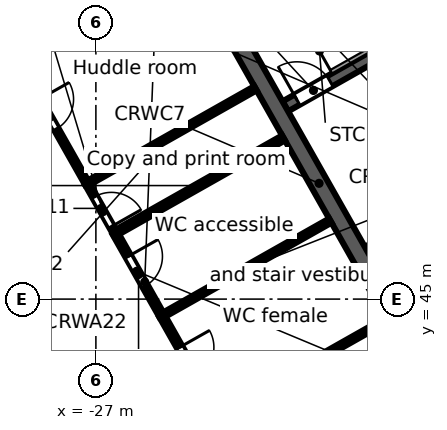
"""IFC4 building model, lengths in metres.
Left out: names, types, materials, properties, quantities, classifications, styles, units other than length and angle.
Written with IfcOpenShell. Run it as: python <this file> out.ifc"""

import sys

from ifc_helpers import new_model, si_unit, direction, frame, frame_2d, origin, place, context, subcontext, project, spatial, rectangle, extrude, element, fill, save


model = new_model("IFC4")
c1 = context("Model", 3, precision=1e-05, world=origin(), true_north=direction((0.0, 1.0)))
c2 = subcontext(c1, "Body", "Model", "MODEL_VIEW")
j1 = project(units=[si_unit("LENGTHUNIT", "METRE"), si_unit("PLANEANGLEUNIT", "RADIAN")], contexts=[c1])
p1 = place(None, origin())
s1 = spatial("IfcSite", under=j1, at=p1, CompositionType="ELEMENT")
p2 = place(p1, origin())
s2 = spatial("IfcBuilding", under=s1, at=p2, CompositionType="ELEMENT")
p3 = place(p2, frame((0.0, 0.0, 227.0)))
s3 = spatial("IfcBuildingStorey", under=s2, at=p3, CompositionType="ELEMENT", Elevation=227.0)
p4 = place(p3, frame((-0.046, 47.974, 0.0), z_axis=(0.0, 0.0, 1.0), x_axis=(-0.870356579543, -0.492421998337, 0.0)))
e1 = element("IfcWall", 1, at=p4, inside=s3, PredefinedType="STANDARD", context=c2, shape_type="SweptSolid", body=[
    extrude(rectangle(XDim=43.754, YDim=0.25, at=frame_2d((21.877, 0.0))), origin(), (0.0, 0.0, 1.0), 3.55),
])
p5 = place(p4, frame((41.061, 0.0, 0.8)))
e2 = element("IfcOpeningElement", 2, at=p5, cuts=e1, PredefinedType="OPENING", context=c2, shape_type="SweptSolid", body=[
    extrude(rectangle(XDim=2.4, YDim=2.2, at=frame_2d((1.2, 1.1))), frame((0.0, 0.135, 0.0), z_axis=(0.0, -1.0, 0.0), x_axis=(1.0, 0.0, 0.0)), (0.0, 0.0, 1.0), 0.27),
])
p6 = place(p4, frame((38.443, 0.0, 0.0)))
e3 = element("IfcOpeningElement", 3, at=p6, cuts=e1, PredefinedType="OPENING", context=c2, shape_type="SweptSolid", body=[
    extrude(rectangle(XDim=1.8, YDim=2.4, at=frame_2d((0.9, 1.2))), frame((0.0, 0.135, 0.0), z_axis=(0.0, -1.0, 0.0), x_axis=(1.0, 0.0, 0.0)), (0.0, 0.0, 1.0), 0.27),
])
p7 = place(p4, frame((35.225, 0.0, 0.8)))
e4 = element("IfcOpeningElement", 4, at=p7, cuts=e1, PredefinedType="OPENING", context=c2, shape_type="SweptSolid", body=[
    extrude(rectangle(XDim=2.4, YDim=2.2, at=frame_2d((1.2, 1.1))), frame((0.0, 0.135, 0.0), z_axis=(0.0, -1.0, 0.0), x_axis=(1.0, 0.0, 0.0)), (0.0, 0.0, 1.0), 0.27),
])
p8 = place(p4, frame((32.307, 0.0, 0.8)))
e5 = element("IfcOpeningElement", 5, at=p8, cuts=e1, PredefinedType="OPENING", context=c2, shape_type="SweptSolid", body=[
    extrude(rectangle(XDim=2.4, YDim=2.2, at=frame_2d((1.2, 1.1))), frame((0.0, 0.135, 0.0), z_axis=(0.0, -1.0, 0.0), x_axis=(1.0, 0.0, 0.0)), (0.0, 0.0, 1.0), 0.27),
])
p9 = place(p4, frame((29.688, 0.0, 0.0)))
e6 = element("IfcOpeningElement", 6, at=p9, cuts=e1, PredefinedType="OPENING", context=c2, shape_type="SweptSolid", body=[
    extrude(rectangle(XDim=1.8, YDim=2.4, at=frame_2d((0.9, 1.2))), frame((0.0, 0.135, 0.0), z_axis=(0.0, -1.0, 0.0), x_axis=(1.0, 0.0, 0.0)), (0.0, 0.0, 1.0), 0.27),
])
p10 = place(p4, frame((26.47, 0.0, 0.8)))
e7 = element("IfcOpeningElement", 7, at=p10, cuts=e1, PredefinedType="OPENING", context=c2, shape_type="SweptSolid", body=[
    extrude(rectangle(XDim=2.4, YDim=2.2, at=frame_2d((1.2, 1.1))), frame((0.0, 0.135, 0.0), z_axis=(0.0, -1.0, 0.0), x_axis=(1.0, 0.0, 0.0)), (0.0, 0.0, 1.0), 0.27),
])
p11 = place(p4, frame((23.552, 0.0, 0.8)))
e8 = element("IfcOpeningElement", 8, at=p11, cuts=e1, PredefinedType="OPENING", context=c2, shape_type="SweptSolid", body=[
    extrude(rectangle(XDim=2.4, YDim=2.2, at=frame_2d((1.2, 1.1))), frame((0.0, 0.135, 0.0), z_axis=(0.0, -1.0, 0.0), x_axis=(1.0, 0.0, 0.0)), (0.0, 0.0, 1.0), 0.27),
])
p12 = place(p4, frame((20.934, 0.0, 0.0)))
e9 = element("IfcOpeningElement", 9, at=p12, cuts=e1, PredefinedType="OPENING", context=c2, shape_type="SweptSolid", body=[
    extrude(rectangle(XDim=1.8, YDim=2.4, at=frame_2d((0.9, 1.2))), frame((0.0, 0.135, 0.0), z_axis=(0.0, -1.0, 0.0), x_axis=(1.0, 0.0, 0.0)), (0.0, 0.0, 1.0), 0.27),
])
p13 = place(p4, frame((17.716, 0.0, 0.8)))
e10 = element("IfcOpeningElement", 10, at=p13, cuts=e1, PredefinedType="OPENING", context=c2, shape_type="SweptSolid", body=[
    extrude(rectangle(XDim=2.4, YDim=2.2, at=frame_2d((1.2, 1.1))), frame((0.0, 0.135, 0.0), z_axis=(0.0, -1.0, 0.0), x_axis=(1.0, 0.0, 0.0)), (0.0, 0.0, 1.0), 0.27),
])
p14 = place(p4, frame((14.798, 0.0, 0.8)))
e11 = element("IfcOpeningElement", 11, at=p14, cuts=e1, PredefinedType="OPENING", context=c2, shape_type="SweptSolid", body=[
    extrude(rectangle(XDim=2.4, YDim=2.2, at=frame_2d((1.2, 1.1))), frame((0.0, 0.135, 0.0), z_axis=(0.0, -1.0, 0.0), x_axis=(1.0, 0.0, 0.0)), (0.0, 0.0, 1.0), 0.27),
])
p15 = place(p4, frame((12.179, 0.0, 0.0)))
e12 = element("IfcOpeningElement", 12, at=p15, cuts=e1, PredefinedType="OPENING", context=c2, shape_type="SweptSolid", body=[
    extrude(rectangle(XDim=1.8, YDim=2.4, at=frame_2d((0.9, 1.2))), frame((0.0, 0.135, 0.0), z_axis=(0.0, -1.0, 0.0), x_axis=(1.0, 0.0, 0.0)), (0.0, 0.0, 1.0), 0.27),
])
p16 = place(p4, frame((8.961, 0.0, 0.8)))
e13 = element("IfcOpeningElement", 13, at=p16, cuts=e1, PredefinedType="OPENING", context=c2, shape_type="SweptSolid", body=[
    extrude(rectangle(XDim=2.4, YDim=2.2, at=frame_2d((1.2, 1.1))), frame((0.0, 0.135, 0.0), z_axis=(0.0, -1.0, 0.0), x_axis=(1.0, 0.0, 0.0)), (0.0, 0.0, 1.0), 0.27),
])
p17 = place(p4, frame((6.043, 0.0, 0.8)))
e14 = element("IfcOpeningElement", 14, at=p17, cuts=e1, PredefinedType="OPENING", context=c2, shape_type="SweptSolid", body=[
    extrude(rectangle(XDim=2.4, YDim=2.2, at=frame_2d((1.2, 1.1))), frame((0.0, 0.135, 0.0), z_axis=(0.0, -1.0, 0.0), x_axis=(1.0, 0.0, 0.0)), (0.0, 0.0, 1.0), 0.27),
])
p18 = place(p4, frame((3.425, 0.0, 0.0)))
e15 = element("IfcOpeningElement", 15, at=p18, cuts=e1, PredefinedType="OPENING", context=c2, shape_type="SweptSolid", body=[
    extrude(rectangle(XDim=1.8, YDim=2.4, at=frame_2d((0.9, 1.2))), frame((0.0, 0.135, 0.0), z_axis=(0.0, -1.0, 0.0), x_axis=(1.0, 0.0, 0.0)), (0.0, 0.0, 1.0), 0.27),
])
p19 = place(p4, frame((0.207, 0.0, 0.8)))
e16 = element("IfcOpeningElement", 16, at=p19, cuts=e1, PredefinedType="OPENING", context=c2, shape_type="SweptSolid", body=[
    extrude(rectangle(XDim=2.4, YDim=2.2, at=frame_2d((1.2, 1.1))), frame((0.0, 0.135, 0.0), z_axis=(0.0, -1.0, 0.0), x_axis=(1.0, 0.0, 0.0)), (0.0, 0.0, 1.0), 0.27),
])
p20 = place(p3, frame((-58.732, 38.771, 0.0), z_axis=(0.0, 0.0, 1.0), x_axis=(0.870354824205, 0.492425100887, 0.0)))
e17 = element("IfcWall", 17, at=p20, inside=s3, PredefinedType="STANDARD", context=c2, shape_type="SweptSolid", body=[
    extrude(rectangle(XDim=64.006, YDim=0.25, at=frame_2d((32.003, 0.0))), origin(), (0.0, 0.0, 1.0), 3.55),
])
p21 = place(p20, frame((61.259, 0.0, 0.8)))
e18 = element("IfcOpeningElement", 18, at=p21, cuts=e17, PredefinedType="OPENING", context=c2, shape_type="SweptSolid", body=[
    extrude(rectangle(XDim=2.4, YDim=2.2, at=frame_2d((1.2, 1.1))), frame((0.0, 0.135, 0.0), z_axis=(0.0, -1.0, 0.0), x_axis=(1.0, 0.0, 0.0)), (0.0, 0.0, 1.0), 0.27),
])
p22 = place(p20, frame((58.216, 0.0, 0.8)))
e19 = element("IfcOpeningElement", 19, at=p22, cuts=e17, PredefinedType="OPENING", context=c2, shape_type="SweptSolid", body=[
    extrude(rectangle(XDim=2.4, YDim=2.2, at=frame_2d((1.2, 1.1))), frame((0.0, 0.135, 0.0), z_axis=(0.0, -1.0, 0.0), x_axis=(1.0, 0.0, 0.0)), (0.0, 0.0, 1.0), 0.27),
])
p23 = place(p20, frame((55.173, 0.0, 0.8)))
e20 = element("IfcOpeningElement", 20, at=p23, cuts=e17, PredefinedType="OPENING", context=c2, shape_type="SweptSolid", body=[
    extrude(rectangle(XDim=2.4, YDim=2.2, at=frame_2d((1.2, 1.1))), frame((0.0, 0.135, 0.0), z_axis=(0.0, -1.0, 0.0), x_axis=(1.0, 0.0, 0.0)), (0.0, 0.0, 1.0), 0.27),
])
p24 = place(p20, frame((52.129, 0.0, 0.8)))
e21 = element("IfcOpeningElement", 21, at=p24, cuts=e17, PredefinedType="OPENING", context=c2, shape_type="SweptSolid", body=[
    extrude(rectangle(XDim=2.4, YDim=2.2, at=frame_2d((1.2, 1.1))), frame((0.0, 0.135, 0.0), z_axis=(0.0, -1.0, 0.0), x_axis=(1.0, 0.0, 0.0)), (0.0, 0.0, 1.0), 0.27),
])
p25 = place(p20, frame((49.086, 0.0, 0.8)))
e22 = element("IfcOpeningElement", 22, at=p25, cuts=e17, PredefinedType="OPENING", context=c2, shape_type="SweptSolid", body=[
    extrude(rectangle(XDim=2.4, YDim=2.2, at=frame_2d((1.2, 1.1))), frame((0.0, 0.135, 0.0), z_axis=(0.0, -1.0, 0.0), x_axis=(1.0, 0.0, 0.0)), (0.0, 0.0, 1.0), 0.27),
])
p26 = place(p20, frame((46.043, 0.0, 0.8)))
e23 = element("IfcOpeningElement", 23, at=p26, cuts=e17, PredefinedType="OPENING", context=c2, shape_type="SweptSolid", body=[
    extrude(rectangle(XDim=2.4, YDim=2.2, at=frame_2d((1.2, 1.1))), frame((0.0, 0.135, 0.0), z_axis=(0.0, -1.0, 0.0), x_axis=(1.0, 0.0, 0.0)), (0.0, 0.0, 1.0), 0.27),
])
p27 = place(p20, frame((43.0, 0.0, 0.8)))
e24 = element("IfcOpeningElement", 24, at=p27, cuts=e17, PredefinedType="OPENING", context=c2, shape_type="SweptSolid", body=[
    extrude(rectangle(XDim=2.4, YDim=2.2, at=frame_2d((1.2, 1.1))), frame((0.0, 0.135, 0.0), z_axis=(0.0, -1.0, 0.0), x_axis=(1.0, 0.0, 0.0)), (0.0, 0.0, 1.0), 0.27),
])
p28 = place(p20, frame((39.956, 0.0, 0.8)))
e25 = element("IfcOpeningElement", 25, at=p28, cuts=e17, PredefinedType="OPENING", context=c2, shape_type="SweptSolid", body=[
    extrude(rectangle(XDim=2.4, YDim=2.2, at=frame_2d((1.2, 1.1))), frame((0.0, 0.135, 0.0), z_axis=(0.0, -1.0, 0.0), x_axis=(1.0, 0.0, 0.0)), (0.0, 0.0, 1.0), 0.27),
])
p29 = place(p20, frame((36.913, 0.0, 0.8)))
e26 = element("IfcOpeningElement", 26, at=p29, cuts=e17, PredefinedType="OPENING", context=c2, shape_type="SweptSolid", body=[
    extrude(rectangle(XDim=2.4, YDim=2.2, at=frame_2d((1.2, 1.1))), frame((0.0, 0.135, 0.0), z_axis=(0.0, -1.0, 0.0), x_axis=(1.0, 0.0, 0.0)), (0.0, 0.0, 1.0), 0.27),
])
p30 = place(p20, frame((33.87, 0.0, 0.8)))
e27 = element("IfcOpeningElement", 27, at=p30, cuts=e17, PredefinedType="OPENING", context=c2, shape_type="SweptSolid", body=[
    extrude(rectangle(XDim=2.4, YDim=2.2, at=frame_2d((1.2, 1.1))), frame((0.0, 0.135, 0.0), z_axis=(0.0, -1.0, 0.0), x_axis=(1.0, 0.0, 0.0)), (0.0, 0.0, 1.0), 0.27),
])
p31 = place(p20, frame((30.826, 0.0, 0.8)))
e28 = element("IfcOpeningElement", 28, at=p31, cuts=e17, PredefinedType="OPENING", context=c2, shape_type="SweptSolid", body=[
    extrude(rectangle(XDim=2.4, YDim=2.2, at=frame_2d((1.2, 1.1))), frame((0.0, 0.135, 0.0), z_axis=(0.0, -1.0, 0.0), x_axis=(1.0, 0.0, 0.0)), (0.0, 0.0, 1.0), 0.27),
])
p32 = place(p20, frame((27.783, 0.0, 0.8)))
e29 = element("IfcOpeningElement", 29, at=p32, cuts=e17, PredefinedType="OPENING", context=c2, shape_type="SweptSolid", body=[
    extrude(rectangle(XDim=2.4, YDim=2.2, at=frame_2d((1.2, 1.1))), frame((0.0, 0.135, 0.0), z_axis=(0.0, -1.0, 0.0), x_axis=(1.0, 0.0, 0.0)), (0.0, 0.0, 1.0), 0.27),
])
p33 = place(p20, frame((24.74, 0.0, 0.8)))
e30 = element("IfcOpeningElement", 30, at=p33, cuts=e17, PredefinedType="OPENING", context=c2, shape_type="SweptSolid", body=[
    extrude(rectangle(XDim=2.4, YDim=2.2, at=frame_2d((1.2, 1.1))), frame((0.0, 0.135, 0.0), z_axis=(0.0, -1.0, 0.0), x_axis=(1.0, 0.0, 0.0)), (0.0, 0.0, 1.0), 0.27),
])
p34 = place(p20, frame((21.696, 0.0, 0.8)))
e31 = element("IfcOpeningElement", 31, at=p34, cuts=e17, PredefinedType="OPENING", context=c2, shape_type="SweptSolid", body=[
    extrude(rectangle(XDim=2.4, YDim=2.2, at=frame_2d((1.2, 1.1))), frame((0.0, 0.135, 0.0), z_axis=(0.0, -1.0, 0.0), x_axis=(1.0, 0.0, 0.0)), (0.0, 0.0, 1.0), 0.27),
])
p35 = place(p20, frame((18.653, 0.0, 0.8)))
e32 = element("IfcOpeningElement", 32, at=p35, cuts=e17, PredefinedType="OPENING", context=c2, shape_type="SweptSolid", body=[
    extrude(rectangle(XDim=2.4, YDim=2.2, at=frame_2d((1.2, 1.1))), frame((0.0, 0.135, 0.0), z_axis=(0.0, -1.0, 0.0), x_axis=(1.0, 0.0, 0.0)), (0.0, 0.0, 1.0), 0.27),
])
p36 = place(p20, frame((15.61, 0.0, 0.8)))
e33 = element("IfcOpeningElement", 33, at=p36, cuts=e17, PredefinedType="OPENING", context=c2, shape_type="SweptSolid", body=[
    extrude(rectangle(XDim=2.4, YDim=2.2, at=frame_2d((1.2, 1.1))), frame((0.0, 0.135, 0.0), z_axis=(0.0, -1.0, 0.0), x_axis=(1.0, 0.0, 0.0)), (0.0, 0.0, 1.0), 0.27),
])
p37 = place(p20, frame((12.567, 0.0, 0.8)))
e34 = element("IfcOpeningElement", 34, at=p37, cuts=e17, PredefinedType="OPENING", context=c2, shape_type="SweptSolid", body=[
    extrude(rectangle(XDim=2.4, YDim=2.2, at=frame_2d((1.2, 1.1))), frame((0.0, 0.135, 0.0), z_axis=(0.0, -1.0, 0.0), x_axis=(1.0, 0.0, 0.0)), (0.0, 0.0, 1.0), 0.27),
])
p38 = place(p20, frame((9.523, 0.0, 0.8)))
e35 = element("IfcOpeningElement", 35, at=p38, cuts=e17, PredefinedType="OPENING", context=c2, shape_type="SweptSolid", body=[
    extrude(rectangle(XDim=2.4, YDim=2.2, at=frame_2d((1.2, 1.1))), frame((0.0, 0.135, 0.0), z_axis=(0.0, -1.0, 0.0), x_axis=(1.0, 0.0, 0.0)), (0.0, 0.0, 1.0), 0.27),
])
p39 = place(p20, frame((6.48, 0.0, 0.8)))
e36 = element("IfcOpeningElement", 36, at=p39, cuts=e17, PredefinedType="OPENING", context=c2, shape_type="SweptSolid", body=[
    extrude(rectangle(XDim=2.4, YDim=2.2, at=frame_2d((1.2, 1.1))), frame((0.0, 0.135, 0.0), z_axis=(0.0, -1.0, 0.0), x_axis=(1.0, 0.0, 0.0)), (0.0, 0.0, 1.0), 0.27),
])
p40 = place(p20, frame((3.437, 0.0, 0.8)))
e37 = element("IfcOpeningElement", 37, at=p40, cuts=e17, PredefinedType="OPENING", context=c2, shape_type="SweptSolid", body=[
    extrude(rectangle(XDim=2.4, YDim=2.2, at=frame_2d((1.2, 1.1))), frame((0.0, 0.135, 0.0), z_axis=(0.0, -1.0, 0.0), x_axis=(1.0, 0.0, 0.0)), (0.0, 0.0, 1.0), 0.27),
])
p41 = place(p20, frame((0.393, 0.0, 0.8)))
e38 = element("IfcOpeningElement", 38, at=p41, cuts=e17, PredefinedType="OPENING", context=c2, shape_type="SweptSolid", body=[
    extrude(rectangle(XDim=2.4, YDim=2.2, at=frame_2d((1.2, 1.1))), frame((0.0, 0.135, 0.0), z_axis=(0.0, -1.0, 0.0), x_axis=(1.0, 0.0, 0.0)), (0.0, 0.0, 1.0), 0.27),
])
p42 = place(p3, frame((-31.787, 49.542, 0.0), z_axis=(0.0, 0.0, 1.0), x_axis=(0.492421378713, -0.870356930107, 0.0)))
e39 = element("IfcWall", 39, at=p42, inside=s3, PredefinedType="SOLIDWALL", context=c2, shape_type="SweptSolid", body=[
    extrude(rectangle(XDim=13.1, YDim=0.45, at=frame_2d((6.55, 0.0))), origin(), (0.0, 0.0, 1.0), 3.55),
])
p43 = place(p3, frame((-19.849, 46.242, 0.0), z_axis=(0.0, 0.0, 1.0), x_axis=(0.870347559728, 0.492437940532, 0.0)))
e40 = element("IfcWall", 40, at=p43, inside=s3, PredefinedType="SOLIDWALL", context=c2, shape_type="SweptSolid", body=[
    extrude(rectangle(XDim=5.05, YDim=0.3, at=frame_2d((2.525, 0.0))), origin(), (0.0, 0.0, 1.0), 3.55),
])
p44 = place(p43, frame((0.7, 0.0, 0.0)))
e41 = element("IfcOpeningElement", 41, at=p44, cuts=e40, PredefinedType="OPENING", context=c2, shape_type="SweptSolid", body=[
    extrude(rectangle(XDim=1.1, YDim=2.1, at=frame_2d((0.55, 1.05))), frame((0.0, 0.16, 0.0), z_axis=(0.0, -1.0, 0.0), x_axis=(1.0, 0.0, 0.0)), (0.0, 0.0, 1.0), 0.32),
])
p45 = place(p43, frame((3.8, 0.0, 0.0)))
e42 = element("IfcOpeningElement", 42, at=p45, cuts=e40, PredefinedType="OPENING", context=c2, shape_type="SweptSolid", body=[
    extrude(rectangle(XDim=0.9, YDim=2.1, at=frame_2d((0.45, 1.05))), frame((0.0, 0.16, 0.0), z_axis=(0.0, -1.0, 0.0), x_axis=(1.0, 0.0, 0.0)), (0.0, 0.0, 1.0), 0.32),
])
p46 = place(p3, frame((-22.015, 50.072, 0.0), z_axis=(0.0, 0.0, 1.0), x_axis=(0.870354900257, 0.492424966466, 0.0)))
e43 = element("IfcWall", 43, at=p46, inside=s3, PredefinedType="SOLIDWALL", context=c2, shape_type="SweptSolid", body=[
    extrude(rectangle(XDim=7.35, YDim=0.3, at=frame_2d((3.675, 0.0))), origin(), (0.0, 0.0, 1.0), 3.55),
])
p47 = place(p46, frame((0.35, 0.0, 0.0)))
e44 = element("IfcOpeningElement", 44, at=p47, cuts=e43, PredefinedType="OPENING", context=c2, shape_type="SweptSolid", body=[
    extrude(rectangle(XDim=1.0, YDim=2.1, at=frame_2d((0.5, 1.05))), frame((0.0, 0.16, 0.0), z_axis=(0.0, -1.0, 0.0), x_axis=(1.0, 0.0, 0.0)), (0.0, 0.0, 1.0), 0.32),
])
p48 = place(p3, frame((-24.353, 53.747, 0.0), z_axis=(0.0, 0.0, 1.0), x_axis=(0.492435496286, -0.870348942665, 0.0)))
e45 = element("IfcWall", 45, at=p48, inside=s3, PredefinedType="SOLIDWALL", context=c2, shape_type="SweptSolid", body=[
    extrude(rectangle(XDim=13.1, YDim=0.45, at=frame_2d((6.55, 0.0))), origin(), (0.0, 0.0, 1.0), 3.55),
])
p49 = place(p3, frame((-29.201, 51.521, 0.0), z_axis=(0.0, 0.0, 1.0), x_axis=(0.870150176056, 0.492786638526, 0.0)))
e46 = element("IfcWall", 46, at=p49, inside=s3, PredefinedType="PARTITIONING", context=c2, shape_type="SweptSolid", body=[
    extrude(rectangle(XDim=1.5, YDim=0.125, at=frame_2d((0.75, 0.0))), origin(), (0.0, 0.0, 1.0), 3.55),
])
p50 = place(p3, frame((-29.201, 51.521, 0.0), z_axis=(0.0, 0.0, 1.0), x_axis=(0.492340861121, -0.870402479587, 0.0)))
e47 = element("IfcWall", 47, at=p50, inside=s3, PredefinedType="PARTITIONING", context=c2, shape_type="SweptSolid", body=[
    extrude(rectangle(XDim=3.999, YDim=0.125, at=frame_2d((2.0, 0.0))), origin(), (0.0, 0.0, 1.0), 3.55),
])
p51 = place(p50, frame((1.45, 0.0, 0.0)))
e48 = element("IfcOpeningElement", 48, at=p51, cuts=e47, PredefinedType="OPENING", context=c2, shape_type="SweptSolid", body=[
    extrude(rectangle(XDim=0.9, YDim=2.1, at=frame_2d((0.45, 1.05))), frame((0.0, 0.073, 0.0), z_axis=(0.0, -1.0, 0.0), x_axis=(1.0, 0.0, 0.0)), (0.0, 0.0, 1.0), 0.145),
])
p52 = place(p3, frame((-27.232, 48.04, 0.0), z_axis=(0.0, 0.0, 1.0), x_axis=(0.492437810475, -0.870347633314, 0.0)))
e49 = element("IfcWall", 49, at=p52, inside=s3, PredefinedType="PARTITIONING", context=c2, shape_type="SweptSolid", body=[
    extrude(rectangle(XDim=1.501, YDim=0.125, at=frame_2d((0.75, 0.0))), origin(), (0.0, 0.0, 1.0), 3.55),
])
p53 = place(p52, frame((0.4, 0.0, 0.0)))
e50 = element("IfcOpeningElement", 50, at=p53, cuts=e49, PredefinedType="OPENING", context=c2, shape_type="SweptSolid", body=[
    extrude(rectangle(XDim=0.9, YDim=2.1, at=frame_2d((0.45, 1.05))), frame((0.0, 0.073, 0.0), z_axis=(0.0, -1.0, 0.0), x_axis=(1.0, 0.0, 0.0)), (0.0, 0.0, 1.0), 0.145),
])
p54 = place(p3, frame((-27.232, 48.04, 0.0), z_axis=(0.0, 0.0, 1.0), x_axis=(0.870339461844, 0.492452252668, 0.0)))
e51 = element("IfcWall", 51, at=p54, inside=s3, PredefinedType="PARTITIONING", context=c2, shape_type="SweptSolid", body=[
    extrude(rectangle(XDim=5.091, YDim=0.125, at=frame_2d((2.545, 0.0))), origin(), (0.0, 0.0, 1.0), 2.722),
])
p55 = place(p3, frame((-26.493, 46.734, 0.0), z_axis=(0.0, 0.0, 1.0), x_axis=(0.49257867544, -0.870267917656, 0.0)))
e52 = element("IfcWall", 52, at=p55, inside=s3, PredefinedType="PARTITIONING", context=c2, shape_type="SweptSolid", body=[
    extrude(rectangle(XDim=2.499, YDim=0.15, at=frame_2d((1.25, 0.0))), origin(), (0.0, 0.0, 1.0), 2.722),
])
p56 = place(p55, frame((0.7, 0.0, 0.0)))
e53 = element("IfcOpeningElement", 53, at=p56, cuts=e52, PredefinedType="OPENING", context=c2, shape_type="SweptSolid", body=[
    extrude(rectangle(XDim=0.9, YDim=2.1, at=frame_2d((0.45, 1.05))), frame((0.0, 0.085, 0.0), z_axis=(0.0, -1.0, 0.0), x_axis=(1.0, 0.0, 0.0)), (0.0, 0.0, 1.0), 0.17),
])
p57 = place(p3, frame((-26.493, 46.734, 0.0), z_axis=(0.0, 0.0, 1.0), x_axis=(0.870339461844, 0.492452252668, 0.0)))
e54 = element("IfcWall", 54, at=p57, inside=s3, PredefinedType="PARTITIONING", context=c2, shape_type="SweptSolid", body=[
    extrude(rectangle(XDim=5.091, YDim=0.15, at=frame_2d((2.545, 0.0))), origin(), (0.0, 0.0, 1.0), 2.722),
])
p58 = place(p3, frame((-25.262, 44.559, 0.0), z_axis=(0.0, 0.0, 1.0), x_axis=(0.492226144536, -0.870467358742, 0.0)))
e55 = element("IfcWall", 55, at=p58, inside=s3, PredefinedType="PARTITIONING", context=c2, shape_type="SweptSolid", body=[
    extrude(rectangle(XDim=3.001, YDim=0.15, at=frame_2d((1.5, 0.0))), origin(), (0.0, 0.0, 1.0), 3.55),
])
p59 = place(p58, frame((0.95, 0.0, 0.0)))
e56 = element("IfcOpeningElement", 56, at=p59, cuts=e55, PredefinedType="OPENING", context=c2, shape_type="SweptSolid", body=[
    extrude(rectangle(XDim=0.9, YDim=2.1, at=frame_2d((0.45, 1.05))), frame((0.0, 0.085, 0.0), z_axis=(0.0, -1.0, 0.0), x_axis=(1.0, 0.0, 0.0)), (0.0, 0.0, 1.0), 0.17),
])
p60 = place(p3, frame((-25.262, 44.559, 0.0), z_axis=(0.0, 0.0, 1.0), x_axis=(0.870442223229, 0.492270592276, 0.0)))
e57 = element("IfcWall", 57, at=p60, inside=s3, PredefinedType="PARTITIONING", context=c2, shape_type="SweptSolid", body=[
    extrude(rectangle(XDim=5.09, YDim=0.125, at=frame_2d((2.545, 0.0))), origin(), (0.0, 0.0, 1.0), 3.55),
])
p61 = place(p3, frame((-23.785, 41.947, 0.0), z_axis=(0.0, 0.0, 1.0), x_axis=(0.870339461844, 0.492452252668, 0.0)))
e58 = element("IfcWall", 58, at=p61, inside=s3, PredefinedType="PARTITIONING", context=c2, shape_type="SweptSolid", body=[
    extrude(rectangle(XDim=5.091, YDim=0.125, at=frame_2d((2.545, 0.0))), origin(), (0.0, 0.0, 1.0), 3.55),
])
p62 = place(p47, origin())
e59 = element("IfcDoor", 59, at=p62, inside=s3, OperationType="SINGLE_SWING_LEFT", PredefinedType="DOOR", context=c2, shape_type="SweptSolid", body=[
    extrude(rectangle(XDim=1.0, YDim=2.1, at=frame_2d((0.5, 1.05))), frame((0.0, 0.025, 0.0), z_axis=(0.0, -1.0, 0.0), x_axis=(1.0, 0.0, 0.0)), (0.0, 0.0, 1.0), 0.05),
])
fill(e44, e59)
p63 = place(p51, origin())
e60 = element("IfcDoor", 60, at=p63, inside=s3, OperationType="SINGLE_SWING_LEFT", PredefinedType="DOOR", context=c2, shape_type="SweptSolid", body=[
    extrude(rectangle(XDim=0.9, YDim=2.1, at=frame_2d((0.45, 1.05))), frame((0.0, 0.025, 0.0), z_axis=(0.0, -1.0, 0.0), x_axis=(1.0, 0.0, 0.0)), (0.0, 0.0, 1.0), 0.05),
])
fill(e48, e60)
p64 = place(p59, origin())
e61 = element("IfcDoor", 61, at=p64, inside=s3, OperationType="SINGLE_SWING_LEFT", PredefinedType="DOOR", context=c2, shape_type="SweptSolid", body=[
    extrude(rectangle(XDim=0.9, YDim=2.1, at=frame_2d((0.45, 1.05))), frame((0.0, 0.025, 0.0), z_axis=(0.0, -1.0, 0.0), x_axis=(1.0, 0.0, 0.0)), (0.0, 0.0, 1.0), 0.05),
])
fill(e56, e61)
p65 = place(p56, origin())
e62 = element("IfcDoor", 62, at=p65, inside=s3, OperationType="SINGLE_SWING_LEFT", PredefinedType="DOOR", context=c2, shape_type="SweptSolid", body=[
    extrude(rectangle(XDim=0.9, YDim=2.1, at=frame_2d((0.45, 1.05))), frame((0.0, 0.025, 0.0), z_axis=(0.0, -1.0, 0.0), x_axis=(1.0, 0.0, 0.0)), (0.0, 0.0, 1.0), 0.05),
])
fill(e53, e62)
p66 = place(p53, origin())
e63 = element("IfcDoor", 63, at=p66, inside=s3, OperationType="SINGLE_SWING_RIGHT", PredefinedType="DOOR", context=c2, shape_type="SweptSolid", body=[
    extrude(rectangle(XDim=0.9, YDim=2.1, at=frame_2d((0.45, 1.05))), frame((0.0, 0.025, 0.0), z_axis=(0.0, -1.0, 0.0), x_axis=(1.0, 0.0, 0.0)), (0.0, 0.0, 1.0), 0.05),
])
fill(e50, e63)
save(model, sys.argv[1])
